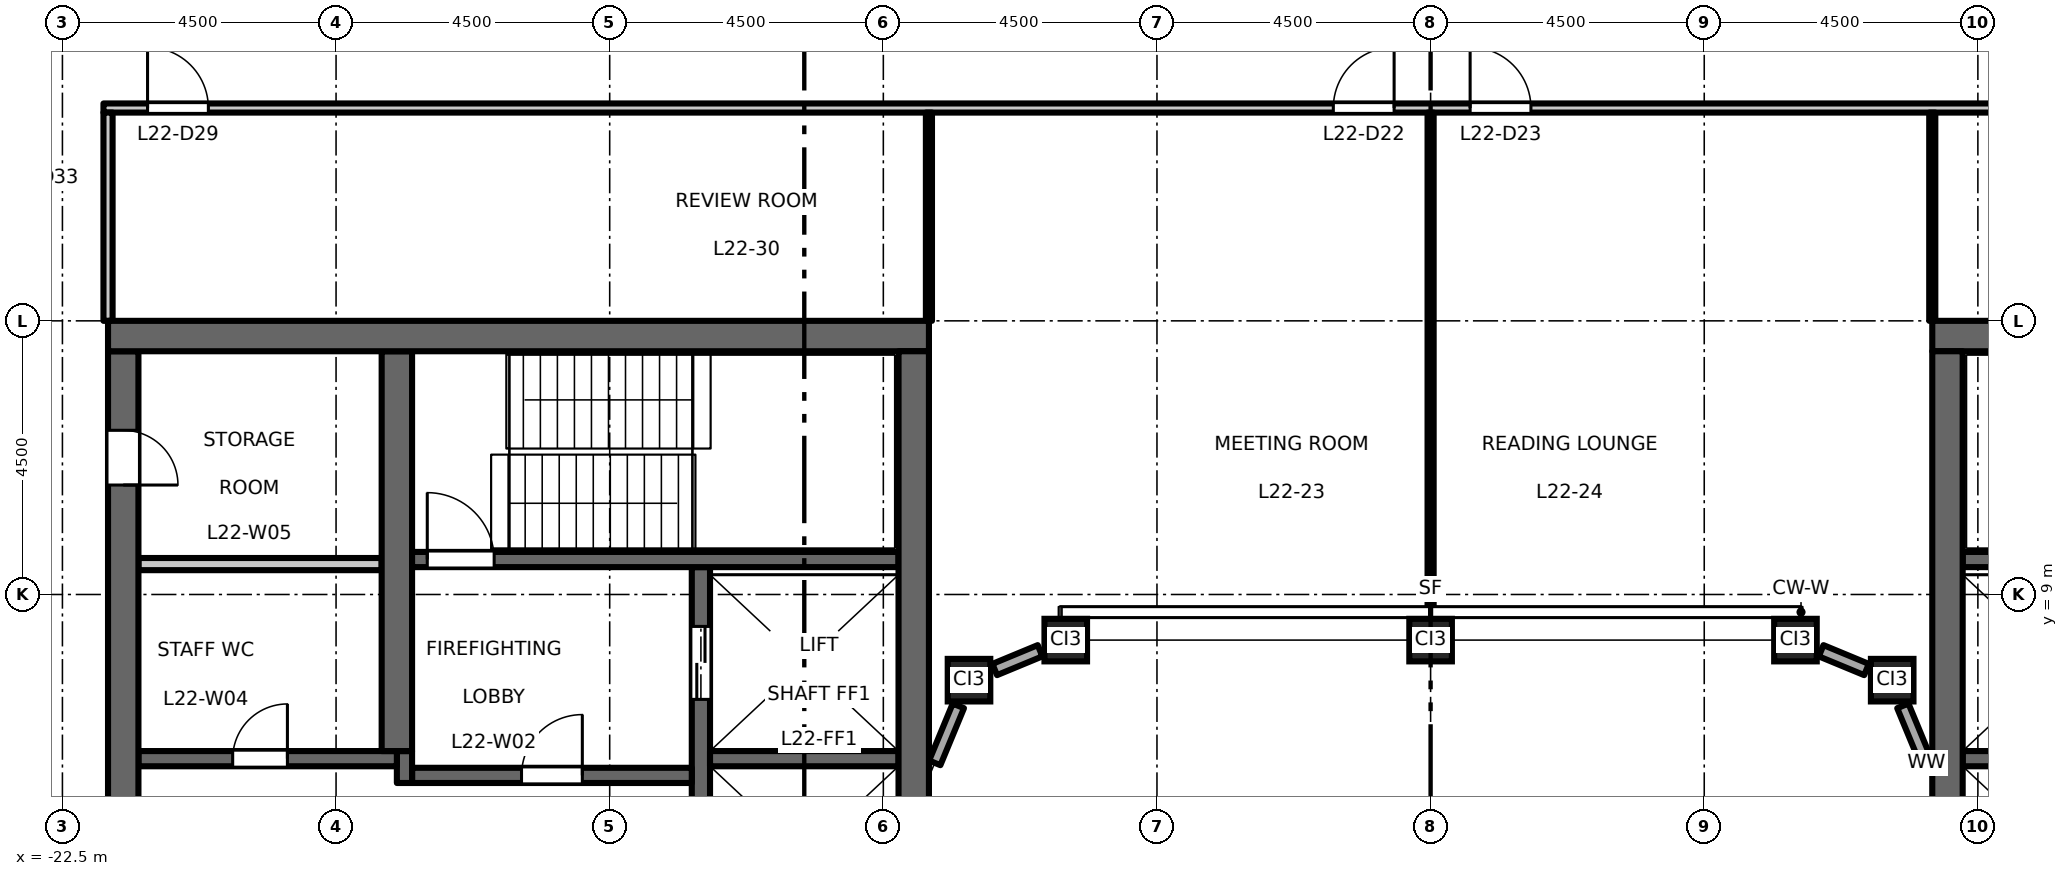
"""IFC4 building model, lengths in metres.
Left out: names, types, materials, properties, quantities, classifications, styles, units other than length and angle.
Written with IfcOpenShell. Run it as: python <this file> out.ifc"""

import sys

from ifc_helpers import new_model, si_unit, direction, frame, frame_2d, origin, origin_2d, place, context, subcontext, project, spatial, rectangle, hollow_rectangle, extrude, element, fill, save


model = new_model("IFC4")
c1 = context("Model", 3, precision=1e-05, world=origin(), true_north=direction((0.0, 1.0)))
c2 = subcontext(c1, "Body", "Model", "MODEL_VIEW")
j1 = project(units=[si_unit("LENGTHUNIT", "METRE"), si_unit("PLANEANGLEUNIT", "RADIAN")], contexts=[c1])
p1 = place(None, origin())
s1 = spatial("IfcSite", under=j1, at=p1, CompositionType="ELEMENT")
p2 = place(p1, origin())
s2 = spatial("IfcBuilding", under=s1, at=p2, CompositionType="ELEMENT")
p3 = place(p2, frame((0.0, 0.0, 104.7)))
s3 = spatial("IfcBuildingStorey", under=s2, at=p3, CompositionType="ELEMENT", Elevation=104.7)
for number, where, z_axis, x_axis in (
    (1, (-7.591, 7.591, 0.0), (0.0, 0.0, 1.0), (1.0, 0.0, 0.0)),
    (2, (-6.0, 8.25, 0.0), (0.0, 0.0, 1.0), (1.0, 0.0, 0.0)),
    (3, (0.0, 8.25, 0.0), (0.0, 0.0, 1.0), (1.0, 0.0, 0.0)),
    (4, (6.0, 8.25, 0.0), (0.0, 0.0, 1.0), (1.0, 0.0, 0.0)),
    (5, (7.591, 7.591, 0.0), (0.0, 0.0, 1.0), (1.0, 0.0, 0.0)),
):
    element("IfcColumn", number, at=place(p3, frame(where, z_axis=z_axis, x_axis=x_axis)), inside=s3, PredefinedType="COLUMN", context=c2, shape_type="SweptSolid", body=[
        extrude(hollow_rectangle(XDim=0.7, YDim=0.7, WallThickness=0.04, at=origin_2d()), origin(), (0.0, 0.0, 1.0), 4.5),
    ])
p4 = place(p3, frame((-12.0, -9.45, 0.0), z_axis=(0.0, 0.0, 1.0), x_axis=(0.0, 1.0, 0.0)))
e6 = element("IfcWall", 6, at=p4, inside=s3, PredefinedType="SHEAR", context=c2, shape_type="SweptSolid", body=[
    extrude(rectangle(XDim=18.9, YDim=0.3, at=frame_2d((9.45, 0.0))), origin(), (0.0, 0.0, 1.0), 4.35),
])
p5 = place(p4, frame((3.625, 0.0, 0.0)))
e7 = element("IfcOpeningElement", 7, at=p5, cuts=e6, PredefinedType="OPENING", context=c2, shape_type="SweptSolid", body=[
    extrude(rectangle(XDim=1.1, YDim=2.1, at=frame_2d((0.55, 1.05))), frame((0.0, 0.16, 0.0), z_axis=(0.0, -1.0, 0.0), x_axis=(1.0, 0.0, 0.0)), (0.0, 0.0, 1.0), 0.32),
])
p6 = place(p4, frame((6.775, 0.0, 0.0)))
e8 = element("IfcOpeningElement", 8, at=p6, cuts=e6, PredefinedType="OPENING", context=c2, shape_type="SweptSolid", body=[
    extrude(rectangle(XDim=1.1, YDim=2.1, at=frame_2d((0.55, 1.05))), frame((0.0, 0.16, 0.0), z_axis=(0.0, -1.0, 0.0), x_axis=(1.0, 0.0, 0.0)), (0.0, 0.0, 1.0), 0.32),
])
p7 = place(p4, frame((9.925, 0.0, 0.0)))
e9 = element("IfcOpeningElement", 9, at=p7, cuts=e6, PredefinedType="OPENING", context=c2, shape_type="SweptSolid", body=[
    extrude(rectangle(XDim=1.1, YDim=2.1, at=frame_2d((0.55, 1.05))), frame((0.0, 0.16, 0.0), z_axis=(0.0, -1.0, 0.0), x_axis=(1.0, 0.0, 0.0)), (0.0, 0.0, 1.0), 0.32),
])
p8 = place(p4, frame((13.075, 0.0, 0.0)))
e10 = element("IfcOpeningElement", 10, at=p8, cuts=e6, PredefinedType="OPENING", context=c2, shape_type="SweptSolid", body=[
    extrude(rectangle(XDim=1.1, YDim=2.1, at=frame_2d((0.55, 1.05))), frame((0.0, 0.16, 0.0), z_axis=(0.0, -1.0, 0.0), x_axis=(1.0, 0.0, 0.0)), (0.0, 0.0, 1.0), 0.32),
])
p9 = place(p4, frame((16.725, 0.0, 0.0)))
e11 = element("IfcOpeningElement", 11, at=p9, cuts=e6, PredefinedType="OPENING", context=c2, shape_type="SweptSolid", body=[
    extrude(rectangle(XDim=1.2, YDim=2.1, at=frame_2d((0.6, 1.05))), frame((0.0, 0.16, 0.0), z_axis=(0.0, -1.0, 0.0), x_axis=(1.0, 0.0, 0.0)), (0.0, 0.0, 1.0), 0.32),
])
p10 = place(p4, frame((0.975, 0.0, 0.0)))
e12 = element("IfcOpeningElement", 12, at=p10, cuts=e6, PredefinedType="OPENING", context=c2, shape_type="SweptSolid", body=[
    extrude(rectangle(XDim=1.2, YDim=2.1, at=frame_2d((0.6, 1.05))), frame((0.0, 0.16, 0.0), z_axis=(0.0, -1.0, 0.0), x_axis=(1.0, 0.0, 0.0)), (0.0, 0.0, 1.0), 0.32),
])
p11 = place(p3, frame((-12.15, 6.025, 0.0), z_axis=(0.0, 0.0, 1.0), x_axis=(-1.0, 0.0, 0.0)))
e13 = element("IfcWall", 13, at=p11, inside=s3, PredefinedType="SHEAR", context=c2, shape_type="SweptSolid", body=[
    extrude(rectangle(XDim=4.6, YDim=0.25, at=frame_2d((2.3, 0.0))), origin(), (0.0, 0.0, 1.0), 4.35),
])
p12 = place(p11, frame((1.8, 0.0, 0.0)))
e14 = element("IfcOpeningElement", 14, at=p12, cuts=e13, PredefinedType="OPENING", context=c2, shape_type="SweptSolid", body=[
    extrude(rectangle(XDim=1.0, YDim=2.1, at=frame_2d((0.5, 1.05))), frame((0.0, 0.135, 0.0), z_axis=(0.0, -1.0, 0.0), x_axis=(1.0, 0.0, 0.0)), (0.0, 0.0, 1.0), 0.27),
])
p13 = place(p3, frame((-16.875, 5.9, 0.0), z_axis=(0.0, 0.0, 1.0), x_axis=(0.0, 1.0, 0.0)))
e15 = element("IfcWall", 15, at=p13, inside=s3, PredefinedType="SHEAR", context=c2, shape_type="SweptSolid", body=[
    extrude(rectangle(XDim=0.525, YDim=0.25, at=frame_2d((0.263, 0.0))), origin(), (0.0, 0.0, 1.0), 4.35),
])
p14 = place(p3, frame((-17.0, 6.3, 0.0), z_axis=(0.0, 0.0, 1.0), x_axis=(-1.0, 0.0, 0.0)))
e16 = element("IfcWall", 16, at=p14, inside=s3, PredefinedType="SHEAR", context=c2, shape_type="SweptSolid", body=[
    extrude(rectangle(XDim=4.25, YDim=0.25, at=frame_2d((2.125, 0.0))), origin(), (0.0, 0.0, 1.0), 4.35),
])
p15 = place(p14, frame((1.8, 0.0, 0.0)))
e17 = element("IfcOpeningElement", 17, at=p15, cuts=e16, PredefinedType="OPENING", context=c2, shape_type="SweptSolid", body=[
    extrude(rectangle(XDim=0.9, YDim=2.1, at=frame_2d((0.45, 1.05))), frame((0.0, 0.135, 0.0), z_axis=(0.0, -1.0, 0.0), x_axis=(1.0, 0.0, 0.0)), (0.0, 0.0, 1.0), 0.27),
])
p16 = place(p3, frame((-21.5, -13.0, 0.0), z_axis=(0.0, 0.0, 1.0), x_axis=(0.0, 1.0, 0.0)))
e18 = element("IfcWall", 18, at=p16, inside=s3, PredefinedType="SHEAR", context=c2, shape_type="SweptSolid", body=[
    extrude(rectangle(XDim=26.0, YDim=0.5, at=frame_2d((13.0, 0.0))), origin(), (0.0, 0.0, 1.0), 4.35),
])
p17 = place(p16, frame((16.825, 0.0, 0.0)))
e19 = element("IfcOpeningElement", 19, at=p17, cuts=e18, PredefinedType="OPENING", context=c2, shape_type="SweptSolid", body=[
    extrude(rectangle(XDim=1.8, YDim=2.1, at=frame_2d((0.9, 1.05))), frame((0.0, 0.26, 0.0), z_axis=(0.0, -1.0, 0.0), x_axis=(1.0, 0.0, 0.0)), (0.0, 0.0, 1.0), 0.52),
])
p18 = place(p16, frame((7.375, 0.0, 0.0)))
e20 = element("IfcOpeningElement", 20, at=p18, cuts=e18, PredefinedType="OPENING", context=c2, shape_type="SweptSolid", body=[
    extrude(rectangle(XDim=1.8, YDim=2.1, at=frame_2d((0.9, 1.05))), frame((0.0, 0.26, 0.0), z_axis=(0.0, -1.0, 0.0), x_axis=(1.0, 0.0, 0.0)), (0.0, 0.0, 1.0), 0.52),
])
p19 = place(p16, frame((23.8, 0.0, 0.0)))
e21 = element("IfcOpeningElement", 21, at=p19, cuts=e18, PredefinedType="OPENING", context=c2, shape_type="SweptSolid", body=[
    extrude(rectangle(XDim=0.9, YDim=2.1, at=frame_2d((0.45, 1.05))), frame((0.0, 0.26, 0.0), z_axis=(0.0, -1.0, 0.0), x_axis=(1.0, 0.0, 0.0)), (0.0, 0.0, 1.0), 0.52),
])
p20 = place(p3, frame((-17.25, 9.5, 0.0), z_axis=(0.0, 0.0, 1.0), x_axis=(-1.0, 0.0, 0.0)))
e22 = element("IfcWall", 22, at=p20, inside=s3, PredefinedType="PARTITIONING", context=c2, shape_type="SweptSolid", body=[
    extrude(rectangle(XDim=4.0, YDim=0.2, at=frame_2d((2.0, 0.0))), origin(), (0.0, 0.0, 1.0), 4.35),
])
p21 = place(p3, frame((-17.0, 6.425, 0.0), z_axis=(0.0, 0.0, 1.0), x_axis=(0.0, 1.0, 0.0)))
e23 = element("IfcWall", 23, at=p21, inside=s3, PredefinedType="SHEAR", context=c2, shape_type="SweptSolid", body=[
    extrude(rectangle(XDim=6.575, YDim=0.5, at=frame_2d((3.288, 0.0))), origin(), (0.0, 0.0, 1.0), 4.35),
])
p22 = place(p3, frame((-8.75, 6.3, 0.0), z_axis=(0.0, 0.0, 1.0), x_axis=(-1.0, 0.0, 0.0)))
e24 = element("IfcWall", 24, at=p22, inside=s3, PredefinedType="SHEAR", context=c2, shape_type="SweptSolid", body=[
    extrude(rectangle(XDim=3.1, YDim=0.25, at=frame_2d((1.55, 0.0))), origin(), (0.0, 0.0, 1.0), 4.35),
])
p23 = place(p3, frame((-8.75, 9.575, 0.0), z_axis=(0.0, 0.0, 1.0), x_axis=(-1.0, 0.0, 0.0)))
e25 = element("IfcWall", 25, at=p23, inside=s3, PredefinedType="SHEAR", context=c2, shape_type="SweptSolid", body=[
    extrude(rectangle(XDim=8.0, YDim=0.25, at=frame_2d((4.0, 0.0))), origin(), (0.0, 0.0, 1.0), 4.35),
])
p24 = place(p23, frame((6.65, 0.0, 0.0)))
e26 = element("IfcOpeningElement", 26, at=p24, cuts=e25, PredefinedType="OPENING", context=c2, shape_type="SweptSolid", body=[
    extrude(rectangle(XDim=1.1, YDim=2.1, at=frame_2d((0.55, 1.05))), frame((0.0, 0.135, 0.0), z_axis=(0.0, -1.0, 0.0), x_axis=(1.0, 0.0, 0.0)), (0.0, 0.0, 1.0), 0.27),
])
p25 = place(p3, frame((-8.25, 13.25, 0.0), z_axis=(0.0, 0.0, 1.0), x_axis=(-1.0, 0.0, 0.0)))
e27 = element("IfcWall", 27, at=p25, inside=s3, PredefinedType="SHEAR", context=c2, shape_type="SweptSolid", body=[
    extrude(rectangle(XDim=13.5, YDim=0.5, at=frame_2d((6.75, 0.0))), origin(), (0.0, 0.0, 1.0), 4.35),
])
p26 = place(p3, frame((-8.5, -13.0, 0.0), z_axis=(0.0, 0.0, 1.0), x_axis=(0.0, 1.0, 0.0)))
e28 = element("IfcWall", 28, at=p26, inside=s3, PredefinedType="SHEAR", context=c2, shape_type="SweptSolid", body=[
    extrude(rectangle(XDim=26.0, YDim=0.5, at=frame_2d((13.0, 0.0))), origin(), (0.0, 0.0, 1.0), 4.35),
])
p27 = place(p3, frame((8.75, 6.3, 0.0), z_axis=(0.0, 0.0, 1.0), x_axis=(1.0, 0.0, 0.0)))
e29 = element("IfcWall", 29, at=p27, inside=s3, PredefinedType="SHEAR", context=c2, shape_type="SweptSolid", body=[
    extrude(rectangle(XDim=3.1, YDim=0.25, at=frame_2d((1.55, 0.0))), origin(), (0.0, 0.0, 1.0), 4.35),
])
p28 = place(p3, frame((8.75, 9.575, 0.0), z_axis=(0.0, 0.0, 1.0), x_axis=(1.0, 0.0, 0.0)))
e30 = element("IfcWall", 30, at=p28, inside=s3, PredefinedType="SHEAR", context=c2, shape_type="SweptSolid", body=[
    extrude(rectangle(XDim=8.0, YDim=0.25, at=frame_2d((4.0, 0.0))), origin(), (0.0, 0.0, 1.0), 4.35),
])
p29 = place(p28, frame((6.65, 0.0, 0.0)))
e31 = element("IfcOpeningElement", 31, at=p29, cuts=e30, PredefinedType="OPENING", context=c2, shape_type="SweptSolid", body=[
    extrude(rectangle(XDim=1.1, YDim=2.1, at=frame_2d((0.55, 1.05))), frame((0.0, 0.135, 0.0), z_axis=(0.0, -1.0, 0.0), x_axis=(1.0, 0.0, 0.0)), (0.0, 0.0, 1.0), 0.27),
])
p30 = place(p3, frame((8.25, 13.25, 0.0), z_axis=(0.0, 0.0, 1.0), x_axis=(1.0, 0.0, 0.0)))
e32 = element("IfcWall", 32, at=p30, inside=s3, PredefinedType="SHEAR", context=c2, shape_type="SweptSolid", body=[
    extrude(rectangle(XDim=13.5, YDim=0.5, at=frame_2d((6.75, 0.0))), origin(), (0.0, 0.0, 1.0), 4.35),
])
p31 = place(p3, frame((8.5, -13.0, 0.0), z_axis=(0.0, 0.0, 1.0), x_axis=(0.0, 1.0, 0.0)))
e33 = element("IfcWall", 33, at=p31, inside=s3, PredefinedType="SHEAR", context=c2, shape_type="SweptSolid", body=[
    extrude(rectangle(XDim=26.0, YDim=0.5, at=frame_2d((13.0, 0.0))), origin(), (0.0, 0.0, 1.0), 4.35),
])
p32 = place(p3, frame((8.154, 6.231, 0.0), z_axis=(0.0, 0.0, 1.0), x_axis=(-0.382769662028, 0.923843810301, 0.0)))
e34 = element("IfcWall", 34, at=p32, inside=s3, PredefinedType="STANDARD", context=c2, shape_type="SweptSolid", body=[
    extrude(rectangle(XDim=1.015, YDim=0.2, at=frame_2d((0.507, 0.0))), origin(), (0.0, 0.0, 1.0), 3.826),
])
for number, where, z_axis, x_axis in (
    (35, (7.168, 7.766, 0.0), (0.0, 0.0, 1.0), (-0.924, 0.383, 0.0)),
    (36, (-6.423, 8.075, 0.0), (0.0, 0.0, 1.0), (-0.924, -0.383, 0.0)),
):
    element("IfcWall", number, at=place(p3, frame(where, z_axis=z_axis, x_axis=x_axis)), inside=s3, PredefinedType="STANDARD", context=c2, shape_type="SweptSolid", body=[
        extrude(rectangle(XDim=0.807, YDim=0.2, at=frame_2d((0.404, 0.0))), origin(), (0.0, 0.0, 1.0), 3.826),
    ])
p33 = place(p3, frame((-7.766, 7.168, 0.0), z_axis=(0.0, 0.0, 1.0), x_axis=(-0.382769662028, -0.923843810301, 0.0)))
e37 = element("IfcWall", 37, at=p33, inside=s3, PredefinedType="STANDARD", context=c2, shape_type="SweptSolid", body=[
    extrude(rectangle(XDim=1.015, YDim=0.2, at=frame_2d((0.507, 0.0))), origin(), (0.0, 0.0, 1.0), 3.826),
])
p34 = place(p3, frame((-21.825, 17.0, 0.0), z_axis=(0.0, 0.0, 1.0), x_axis=(1.0, 0.0, 0.0)))
e38 = element("IfcWall", 38, at=p34, inside=s3, PredefinedType="PARTITIONING", context=c2, shape_type="SweptSolid", body=[
    extrude(rectangle(XDim=43.65, YDim=0.15, at=frame_2d((21.825, 0.0))), origin(), (0.0, 0.0, 1.0), 4.35),
])
p35 = place(p34, frame((20.225, 0.0, 0.0)))
e39 = element("IfcOpeningElement", 39, at=p35, cuts=e38, PredefinedType="OPENING", context=c2, shape_type="SweptSolid", body=[
    extrude(rectangle(XDim=1.0, YDim=2.1, at=frame_2d((0.5, 1.05))), frame((0.0, 0.085, 0.0), z_axis=(0.0, -1.0, 0.0), x_axis=(1.0, 0.0, 0.0)), (0.0, 0.0, 1.0), 0.17),
])
p36 = place(p34, frame((22.475, 0.0, 0.0)))
e40 = element("IfcOpeningElement", 40, at=p36, cuts=e38, PredefinedType="OPENING", context=c2, shape_type="SweptSolid", body=[
    extrude(rectangle(XDim=1.0, YDim=2.1, at=frame_2d((0.5, 1.05))), frame((0.0, 0.085, 0.0), z_axis=(0.0, -1.0, 0.0), x_axis=(1.0, 0.0, 0.0)), (0.0, 0.0, 1.0), 0.17),
])
p37 = place(p34, frame((0.725, 0.0, 0.0)))
e41 = element("IfcOpeningElement", 41, at=p37, cuts=e38, PredefinedType="OPENING", context=c2, shape_type="SweptSolid", body=[
    extrude(rectangle(XDim=1.0, YDim=2.1, at=frame_2d((0.5, 1.05))), frame((0.0, 0.085, 0.0), z_axis=(0.0, -1.0, 0.0), x_axis=(1.0, 0.0, 0.0)), (0.0, 0.0, 1.0), 0.17),
])
p38 = place(p34, frame((41.975, 0.0, 0.0)))
e42 = element("IfcOpeningElement", 42, at=p38, cuts=e38, PredefinedType="OPENING", context=c2, shape_type="SweptSolid", body=[
    extrude(rectangle(XDim=1.0, YDim=2.1, at=frame_2d((0.5, 1.05))), frame((0.0, 0.085, 0.0), z_axis=(0.0, -1.0, 0.0), x_axis=(1.0, 0.0, 0.0)), (0.0, 0.0, 1.0), 0.17),
])
p39 = place(p3, frame((-21.75, 13.5, 0.0), z_axis=(0.0, 0.0, 1.0), x_axis=(0.0, 1.0, 0.0)))
e43 = element("IfcWall", 43, at=p39, inside=s3, PredefinedType="PARTITIONING", context=c2, shape_type="SweptSolid", body=[
    extrude(rectangle(XDim=3.425, YDim=0.15, at=frame_2d((1.712, 0.0))), origin(), (0.0, 0.0, 1.0), 4.35),
])
p40 = place(p3, frame((-8.25, 13.5, 0.0), z_axis=(0.0, 0.0, 1.0), x_axis=(0.0, 1.0, 0.0)))
e44 = element("IfcWall", 44, at=p40, inside=s3, PredefinedType="PARTITIONING", context=c2, shape_type="SweptSolid", body=[
    extrude(rectangle(XDim=3.425, YDim=0.1, at=frame_2d((1.712, 0.0))), origin(), (0.0, 0.0, 1.0), 4.35),
])
p41 = place(p3, frame((0.0, 8.65, 0.0), z_axis=(0.0, 0.0, 1.0), x_axis=(0.0, 1.0, 0.0)))
e45 = element("IfcWall", 45, at=p41, inside=s3, PredefinedType="PARTITIONING", context=c2, shape_type="SweptSolid", body=[
    extrude(rectangle(XDim=8.275, YDim=0.1, at=frame_2d((4.138, 0.0))), origin(), (0.0, 0.0, 1.0), 3.45),
])
p42 = place(p3, frame((8.25, 13.5, 0.0), z_axis=(0.0, 0.0, 1.0), x_axis=(0.0, 1.0, 0.0)))
e46 = element("IfcWall", 46, at=p42, inside=s3, PredefinedType="PARTITIONING", context=c2, shape_type="SweptSolid", body=[
    extrude(rectangle(XDim=3.425, YDim=0.1, at=frame_2d((1.712, 0.0))), origin(), (0.0, 0.0, 1.0), 4.35),
])
p43 = place(p12, origin())
e47 = element("IfcDoor", 47, at=p43, inside=s3, OperationType="SINGLE_SWING_LEFT", PredefinedType="DOOR", context=c2, shape_type="SweptSolid", body=[
    extrude(rectangle(XDim=1.0, YDim=2.1, at=frame_2d((0.5, 1.05))), frame((0.0, 0.025, 0.0), z_axis=(0.0, -1.0, 0.0), x_axis=(1.0, 0.0, 0.0)), (0.0, 0.0, 1.0), 0.05),
])
fill(e14, e47)
p44 = place(p24, origin())
e48 = element("IfcDoor", 48, at=p44, inside=s3, OperationType="SINGLE_SWING_RIGHT", PredefinedType="DOOR", context=c2, shape_type="SweptSolid", body=[
    extrude(rectangle(XDim=1.1, YDim=2.1, at=frame_2d((0.55, 1.05))), frame((0.0, 0.025, 0.0), z_axis=(0.0, -1.0, 0.0), x_axis=(1.0, 0.0, 0.0)), (0.0, 0.0, 1.0), 0.05),
])
fill(e26, e48)
p45 = place(p9, origin())
e49 = element("IfcDoor", 49, at=p45, inside=s3, OperationType="DOUBLE_DOOR_SLIDING", PredefinedType="DOOR", context=c2, shape_type="SweptSolid", body=[
    extrude(rectangle(XDim=1.2, YDim=2.1, at=frame_2d((0.6, 1.05))), frame((0.0, 0.025, 0.0), z_axis=(0.0, -1.0, 0.0), x_axis=(1.0, 0.0, 0.0)), (0.0, 0.0, 1.0), 0.05),
])
fill(e11, e49)
p46 = place(p15, origin())
e50 = element("IfcDoor", 50, at=p46, inside=s3, OperationType="SINGLE_SWING_LEFT", PredefinedType="DOOR", context=c2, shape_type="SweptSolid", body=[
    extrude(rectangle(XDim=0.9, YDim=2.1, at=frame_2d((0.45, 1.05))), frame((0.0, 0.025, 0.0), z_axis=(0.0, -1.0, 0.0), x_axis=(1.0, 0.0, 0.0)), (0.0, 0.0, 1.0), 0.05),
])
fill(e17, e50)
p47 = place(p19, origin())
e51 = element("IfcDoor", 51, at=p47, inside=s3, OperationType="SINGLE_SWING_LEFT", PredefinedType="DOOR", context=c2, shape_type="SweptSolid", body=[
    extrude(rectangle(XDim=0.9, YDim=2.1, at=frame_2d((0.45, 1.05))), frame((0.0, 0.025, 0.0), z_axis=(0.0, -1.0, 0.0), x_axis=(1.0, 0.0, 0.0)), (0.0, 0.0, 1.0), 0.05),
])
fill(e21, e51)
p48 = place(p35, origin())
e52 = element("IfcDoor", 52, at=p48, inside=s3, OperationType="SINGLE_SWING_RIGHT", PredefinedType="DOOR", context=c2, shape_type="SweptSolid", body=[
    extrude(rectangle(XDim=1.0, YDim=2.1, at=frame_2d((0.5, 1.05))), frame((0.0, 0.025, 0.0), z_axis=(0.0, -1.0, 0.0), x_axis=(1.0, 0.0, 0.0)), (0.0, 0.0, 1.0), 0.05),
])
fill(e39, e52)
p49 = place(p36, origin())
e53 = element("IfcDoor", 53, at=p49, inside=s3, OperationType="SINGLE_SWING_LEFT", PredefinedType="DOOR", context=c2, shape_type="SweptSolid", body=[
    extrude(rectangle(XDim=1.0, YDim=2.1, at=frame_2d((0.5, 1.05))), frame((0.0, 0.025, 0.0), z_axis=(0.0, -1.0, 0.0), x_axis=(1.0, 0.0, 0.0)), (0.0, 0.0, 1.0), 0.05),
])
fill(e40, e53)
p50 = place(p37, origin())
e54 = element("IfcDoor", 54, at=p50, inside=s3, OperationType="SINGLE_SWING_LEFT", PredefinedType="DOOR", context=c2, shape_type="SweptSolid", body=[
    extrude(rectangle(XDim=1.0, YDim=2.1, at=frame_2d((0.5, 1.05))), frame((0.0, 0.025, 0.0), z_axis=(0.0, -1.0, 0.0), x_axis=(1.0, 0.0, 0.0)), (0.0, 0.0, 1.0), 0.05),
])
fill(e41, e54)
save(model, sys.argv[1])
